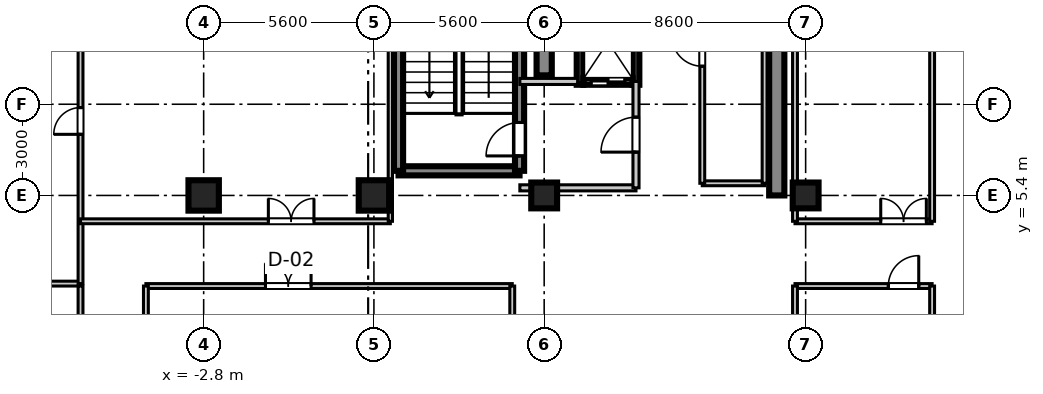
"""IFC4 building model, lengths in metres.
Left out: names, types, materials, properties, quantities, classifications, styles, units other than length and angle.
Written with IfcOpenShell. Run it as: python <this file> out.ifc"""

import sys

from ifc_helpers import new_model, si_unit, direction, frame, frame_2d, origin, origin_2d, place, context, subcontext, project, spatial, rectangle, extrude, source, transform, mapped, element, fill, save


model = new_model("IFC4")
c1 = context("Model", 3, precision=1e-05, world=origin(), true_north=direction((0.0, 1.0)))
c2 = subcontext(c1, "Body", "Model", "MODEL_VIEW")
j1 = project(units=[si_unit("LENGTHUNIT", "METRE"), si_unit("PLANEANGLEUNIT", "RADIAN")], contexts=[c1])
p1 = place(None, origin())
s1 = spatial("IfcSite", under=j1, at=p1, CompositionType="ELEMENT")
p2 = place(p1, origin())
s2 = spatial("IfcBuilding", under=s1, at=p2, CompositionType="ELEMENT")
p3 = place(p2, frame((0.0, 0.0, 249.3)))
s3 = spatial("IfcBuildingStorey", under=s2, at=p3, CompositionType="ELEMENT", Elevation=249.3)
m1 = source(origin(), c2, "Body", "SweptSolid", [
    extrude(rectangle(XDim=1.0, YDim=1.0, at=origin_2d()), origin(), (0.0, 0.0, 1.0), 3.655),
])
for number, where, z_axis, x_axis in (
    (1, (-2.8, 5.4, 0.0), (0.0, 0.0, 1.0), (1.0, 0.0, 0.0)),
    (2, (2.8, 5.4, 0.0), (0.0, 0.0, 1.0), (1.0, 0.0, 0.0)),
):
    element("IfcColumn", number, at=place(p3, frame(where, z_axis=z_axis, x_axis=x_axis)), inside=s3, PredefinedType="COLUMN", context=c2, shape_type="MappedRepresentation", body=[
        mapped(m1, transform((0.0, 0.0, 0.0), scale=1.0)),
    ])
m2 = source(origin(), c2, "Body", "SweptSolid", [
    extrude(rectangle(XDim=0.85, YDim=0.85, at=origin_2d()), origin(), (0.0, 0.0, 1.0), 3.655),
])
for number, where, z_axis, x_axis in (
    (3, (8.4, 5.4, 0.0), (0.0, 0.0, 1.0), (1.0, 0.0, 0.0)),
    (4, (17.0, 5.4, 0.0), (0.0, 0.0, 1.0), (1.0, 0.0, 0.0)),
):
    element("IfcColumn", number, at=place(p3, frame(where, z_axis=z_axis, x_axis=x_axis)), inside=s3, PredefinedType="PILASTER", context=c2, shape_type="MappedRepresentation", body=[
        mapped(m2, transform((0.0, 0.0, 0.0), scale=1.0)),
    ])
m3 = source(origin(), c2, "Body", "SweptSolid", [
    extrude(rectangle(XDim=7.65, YDim=0.5, at=frame_2d((3.825, 0.0))), origin(), (0.0, 0.0, 1.0), 3.41),
])
p4 = place(p3, frame((8.4, 9.35, 0.0), z_axis=(0.0, 0.0, 1.0), x_axis=(0.0, 1.0, 0.0)))
e5 = element("IfcWall", 5, at=p4, inside=s3, PredefinedType="SHEAR", context=c2, shape_type="MappedRepresentation", body=[
    mapped(m3, transform((0.0, 0.0, 0.0), scale=1.0)),
])
m4 = source(origin(), c2, "Body", "SweptSolid", [
    extrude(rectangle(XDim=11.6, YDim=0.5, at=frame_2d((5.8, 0.0))), origin(), (0.0, 0.0, 1.0), 3.41),
])
p5 = place(p3, frame((16.05, 5.4, 0.0), z_axis=(0.0, 0.0, 1.0), x_axis=(0.0, 1.0, 0.0)))
e6 = element("IfcWall", 6, at=p5, inside=s3, PredefinedType="SHEAR", context=c2, shape_type="MappedRepresentation", body=[
    mapped(m4, transform((0.0, 0.0, 0.0), scale=1.0)),
])
m5 = source(origin(), c2, "Body", "SweptSolid", [
    extrude(rectangle(XDim=3.98, YDim=0.3, at=frame_2d((1.99, 0.0))), origin(), (0.0, 0.0, 1.0), 3.41),
])
p6 = place(p3, frame((3.61, 6.21, 0.0), z_axis=(0.0, 0.0, 1.0), x_axis=(1.0, 0.0, 0.0)))
e7 = element("IfcWall", 7, at=p6, inside=s3, PredefinedType="SHEAR", context=c2, shape_type="MappedRepresentation", body=[
    mapped(m5, transform((0.0, 0.0, 0.0), scale=1.0)),
])
m6 = source(origin(), c2, "Body", "SweptSolid", [
    extrude(rectangle(XDim=9.38, YDim=0.3, at=frame_2d((4.69, 0.0))), origin(), (0.0, 0.0, 1.0), 3.41),
])
p7 = place(p3, frame((3.61, 6.21, 0.0), z_axis=(0.0, 0.0, 1.0), x_axis=(0.0, 1.0, 0.0)))
e8 = element("IfcWall", 8, at=p7, inside=s3, PredefinedType="SHEAR", context=c2, shape_type="MappedRepresentation", body=[
    mapped(m6, transform((0.0, 0.0, 0.0), scale=1.0)),
])
p8 = place(p3, frame((7.59, 6.21, 0.0), z_axis=(0.0, 0.0, 1.0), x_axis=(0.0, 1.0, 0.0)))
e9 = element("IfcWall", 9, at=p8, inside=s3, PredefinedType="SHEAR", context=c2, shape_type="MappedRepresentation", body=[
    mapped(m6, transform((0.0, 0.0, 0.0), scale=1.0)),
])
p9 = place(p8, frame((0.49, 0.0, 0.0)))
e10 = element("IfcOpeningElement", 10, at=p9, cuts=e9, PredefinedType="OPENING", context=c2, shape_type="SweptSolid", body=[
    extrude(rectangle(XDim=1.1, YDim=2.15, at=frame_2d((0.55, 1.075))), frame((0.0, 0.16, 0.0), z_axis=(0.0, -1.0, 0.0), x_axis=(1.0, 0.0, 0.0)), (0.0, 0.0, 1.0), 0.32),
])
m7 = source(origin(), c2, "Body", "SweptSolid", [
    extrude(rectangle(XDim=2.82, YDim=0.22, at=frame_2d((1.41, 0.0))), origin(), (0.0, 0.0, 1.0), 3.41),
])
for number, where, z_axis, x_axis in (
    (11, (9.58, 9.04, 0.0), (0.0, 0.0, 1.0), (0.0, 1.0, 0.0)),
    (12, (11.42, 9.04, 0.0), (0.0, 0.0, 1.0), (0.0, 1.0, 0.0)),
):
    element("IfcWall", number, at=place(p3, frame(where, z_axis=z_axis, x_axis=x_axis)), inside=s3, PredefinedType="SHEAR", context=c2, shape_type="MappedRepresentation", body=[
        mapped(m7, transform((0.0, 0.0, 0.0), scale=1.0)),
    ])
m8 = source(origin(), c2, "Body", "SweptSolid", [
    extrude(rectangle(XDim=1.62, YDim=0.22, at=frame_2d((0.81, 0.0))), origin(), (0.0, 0.0, 1.0), 3.41),
])
p10 = place(p3, frame((9.69, 9.15, 0.0), z_axis=(0.0, 0.0, 1.0), x_axis=(1.0, 0.0, 0.0)))
e13 = element("IfcWall", 13, at=p10, inside=s3, PredefinedType="SHEAR", context=c2, shape_type="MappedRepresentation", body=[
    mapped(m8, transform((0.0, 0.0, 0.0), scale=1.0)),
])
p11 = place(p10, frame((0.26, 0.0, 0.0)))
e14 = element("IfcOpeningElement", 14, at=p11, cuts=e13, PredefinedType="OPENING", context=c2, shape_type="SweptSolid", body=[
    extrude(rectangle(XDim=1.1, YDim=2.2, at=frame_2d((0.55, 1.1))), frame((0.0, 0.12, 0.0), z_axis=(0.0, -1.0, 0.0), x_axis=(1.0, 0.0, 0.0)), (0.0, 0.0, 1.0), 0.24),
])
m9 = source(origin(), c2, "Body", "SweptSolid", [
    extrude(rectangle(XDim=3.82, YDim=0.2, at=frame_2d((1.91, 0.0))), origin(), (0.0, 0.0, 1.0), 2.75),
])
p12 = place(p3, frame((7.6, 5.65, 0.0), z_axis=(0.0, 0.0, 1.0), x_axis=(1.0, 0.0, 0.0)))
e15 = element("IfcWall", 15, at=p12, inside=s3, PredefinedType="PARTITIONING", context=c2, shape_type="MappedRepresentation", body=[
    mapped(m9, transform((0.0, 0.0, 0.0), scale=1.0)),
])
m10 = source(origin(), c2, "Body", "SweptSolid", [
    extrude(rectangle(XDim=1.9, YDim=0.2, at=frame_2d((0.95, 0.0))), origin(), (0.0, 0.0, 1.0), 2.75),
])
p13 = place(p3, frame((7.6, 9.15, 0.0), z_axis=(0.0, 0.0, 1.0), x_axis=(1.0, 0.0, 0.0)))
e16 = element("IfcWall", 16, at=p13, inside=s3, PredefinedType="PARTITIONING", context=c2, shape_type="MappedRepresentation", body=[
    mapped(m10, transform((0.0, 0.0, 0.0), scale=1.0)),
])
m11 = source(origin(), c2, "Body", "SweptSolid", [
    extrude(rectangle(XDim=3.5, YDim=0.2, at=frame_2d((1.75, 0.0))), origin(), (0.0, 0.0, 1.0), 2.75),
])
p14 = place(p3, frame((11.42, 5.65, 0.0), z_axis=(0.0, 0.0, 1.0), x_axis=(0.0, 1.0, 0.0)))
e17 = element("IfcWall", 17, at=p14, inside=s3, PredefinedType="PARTITIONING", context=c2, shape_type="MappedRepresentation", body=[
    mapped(m11, transform((0.0, 0.0, 0.0), scale=1.0)),
])
p15 = place(p14, frame((1.175, 0.0, 0.0)))
e18 = element("IfcOpeningElement", 18, at=p15, cuts=e17, PredefinedType="OPENING", context=c2, shape_type="SweptSolid", body=[
    extrude(rectangle(XDim=1.15, YDim=2.15, at=frame_2d((0.575, 1.075))), frame((0.0, 0.11, 0.0), z_axis=(0.0, -1.0, 0.0), x_axis=(1.0, 0.0, 0.0)), (0.0, 0.0, 1.0), 0.22),
])
m12 = source(origin(), c2, "Body", "SweptSolid", [
    extrude(rectangle(XDim=2.05, YDim=0.16, at=frame_2d((1.025, 0.0))), origin(), (0.0, 0.0, 1.0), 2.75),
])
p16 = place(p3, frame((13.6, 5.8, 0.0), z_axis=(0.0, 0.0, 1.0), x_axis=(1.0, 0.0, 0.0)))
e19 = element("IfcWall", 19, at=p16, inside=s3, PredefinedType="PARTITIONING", context=c2, shape_type="MappedRepresentation", body=[
    mapped(m12, transform((0.0, 0.0, 0.0), scale=1.0)),
])
m13 = source(origin(), c2, "Body", "SweptSolid", [
    extrude(rectangle(XDim=8.7, YDim=0.16, at=frame_2d((4.35, 0.0))), origin(), (0.0, 0.0, 1.0), 2.75),
])
p17 = place(p3, frame((13.6, 5.8, 0.0), z_axis=(0.0, 0.0, 1.0), x_axis=(0.0, 1.0, 0.0)))
e20 = element("IfcWall", 20, at=p17, inside=s3, PredefinedType="PARTITIONING", context=c2, shape_type="MappedRepresentation", body=[
    mapped(m13, transform((0.0, 0.0, 0.0), scale=1.0)),
])
p18 = place(p17, frame((3.85, 0.0, 0.0)))
e21 = element("IfcOpeningElement", 21, at=p18, cuts=e20, PredefinedType="OPENING", context=c2, shape_type="SweptSolid", body=[
    extrude(rectangle(XDim=1.0, YDim=2.1, at=frame_2d((0.5, 1.05))), frame((0.0, 0.09, 0.0), z_axis=(0.0, -1.0, 0.0), x_axis=(1.0, 0.0, 0.0)), (0.0, 0.0, 1.0), 0.18),
])
p19 = place(p3, frame((15.65, 5.8, 0.0), z_axis=(0.0, 0.0, 1.0), x_axis=(0.0, 1.0, 0.0)))
e22 = element("IfcWall", 22, at=p19, inside=s3, PredefinedType="PARTITIONING", context=c2, shape_type="MappedRepresentation", body=[
    mapped(m13, transform((0.0, 0.0, 0.0), scale=1.0)),
])
m14 = source(origin(), c2, "Body", "SweptSolid", [
    extrude(rectangle(XDim=4.51, YDim=0.16, at=frame_2d((2.255, 0.0))), origin(), (0.0, 0.0, 1.0), 2.75),
])
p20 = place(p3, frame((16.65, 4.55, 0.0), z_axis=(0.0, 0.0, 1.0), x_axis=(1.0, 0.0, 0.0)))
e23 = element("IfcWall", 23, at=p20, inside=s3, PredefinedType="PARTITIONING", context=c2, shape_type="MappedRepresentation", body=[
    mapped(m14, transform((0.0, 0.0, 0.0), scale=1.0)),
])
p21 = place(p20, frame((2.82, 0.0, 0.0)))
e24 = element("IfcOpeningElement", 24, at=p21, cuts=e23, PredefinedType="OPENING", context=c2, shape_type="SweptSolid", body=[
    extrude(rectangle(XDim=1.5, YDim=2.15, at=frame_2d((0.75, 1.075))), frame((0.0, 0.09, 0.0), z_axis=(0.0, -1.0, 0.0), x_axis=(1.0, 0.0, 0.0)), (0.0, 0.0, 1.0), 0.18),
])
m15 = source(origin(), c2, "Body", "SweptSolid", [
    extrude(rectangle(XDim=19.35, YDim=0.16, at=frame_2d((9.675, 0.0))), origin(), (0.0, 0.0, 1.0), 2.75),
])
p22 = place(p3, frame((16.65, 4.55, 0.0), z_axis=(0.0, 0.0, 1.0), x_axis=(0.0, 1.0, 0.0)))
e25 = element("IfcWall", 25, at=p22, inside=s3, PredefinedType="PARTITIONING", context=c2, shape_type="MappedRepresentation", body=[
    mapped(m15, transform((0.0, 0.0, 0.0), scale=1.0)),
])
m16 = source(origin(), c2, "Body", "SweptSolid", [
    extrude(rectangle(XDim=17.93, YDim=0.16, at=frame_2d((8.965, 0.0))), origin(), (0.0, 0.0, 1.0), 2.75),
])
p23 = place(p3, frame((21.16, 4.55, 0.0), z_axis=(0.0, 0.0, 1.0), x_axis=(0.0, 1.0, 0.0)))
e26 = element("IfcWall", 26, at=p23, inside=s3, PredefinedType="PARTITIONING", context=c2, shape_type="MappedRepresentation", body=[
    mapped(m16, transform((0.0, 0.0, 0.0), scale=1.0)),
])
m17 = source(origin(), c2, "Body", "SweptSolid", [
    extrude(rectangle(XDim=14.31, YDim=0.16, at=frame_2d((7.155, 0.0))), origin(), (0.0, 0.0, 1.0), 2.75),
])
p24 = place(p3, frame((-21.16, 2.5, 0.0), z_axis=(0.0, 0.0, 1.0), x_axis=(1.0, 0.0, 0.0)))
e27 = element("IfcWall", 27, at=p24, inside=s3, PredefinedType="PARTITIONING", context=c2, shape_type="MappedRepresentation", body=[
    mapped(m17, transform((0.0, 0.0, 0.0), scale=1.0)),
])
m18 = source(origin(), c2, "Body", "SweptSolid", [
    extrude(rectangle(XDim=10.7, YDim=0.16, at=frame_2d((5.35, 0.0))), origin(), (0.0, 0.0, 1.0), 2.75),
])
p25 = place(p3, frame((-6.85, 2.5, 0.0), z_axis=(0.0, 0.0, 1.0), x_axis=(0.0, 1.0, 0.0)))
e28 = element("IfcWall", 28, at=p25, inside=s3, PredefinedType="PARTITIONING", context=c2, shape_type="MappedRepresentation", body=[
    mapped(m18, transform((0.0, 0.0, 0.0), scale=1.0)),
])
p26 = place(p25, frame((4.91, 0.0, 0.0)))
e29 = element("IfcOpeningElement", 29, at=p26, cuts=e28, PredefinedType="OPENING", context=c2, shape_type="SweptSolid", body=[
    extrude(rectangle(XDim=0.88, YDim=2.1, at=frame_2d((0.44, 1.05))), frame((0.0, 0.09, 0.0), z_axis=(0.0, -1.0, 0.0), x_axis=(1.0, 0.0, 0.0)), (0.0, 0.0, 1.0), 0.18),
])
m19 = source(origin(), c2, "Body", "SweptSolid", [
    extrude(rectangle(XDim=10.19, YDim=0.16, at=frame_2d((5.095, 0.0))), origin(), (0.0, 0.0, 1.0), 2.75),
])
p27 = place(p3, frame((-6.85, 4.55, 0.0), z_axis=(0.0, 0.0, 1.0), x_axis=(1.0, 0.0, 0.0)))
e30 = element("IfcWall", 30, at=p27, inside=s3, PredefinedType="PARTITIONING", context=c2, shape_type="MappedRepresentation", body=[
    mapped(m19, transform((0.0, 0.0, 0.0), scale=1.0)),
])
p28 = place(p27, frame((6.178, 0.0, 0.0)))
e31 = element("IfcOpeningElement", 31, at=p28, cuts=e30, PredefinedType="OPENING", context=c2, shape_type="SweptSolid", body=[
    extrude(rectangle(XDim=1.5, YDim=2.15, at=frame_2d((0.75, 1.075))), frame((0.0, 0.09, 0.0), z_axis=(0.0, -1.0, 0.0), x_axis=(1.0, 0.0, 0.0)), (0.0, 0.0, 1.0), 0.18),
])
m20 = source(origin(), c2, "Body", "SweptSolid", [
    extrude(rectangle(XDim=19.35, YDim=0.14, at=frame_2d((9.675, 0.0))), origin(), (0.0, 0.0, 1.0), 2.75),
])
p29 = place(p3, frame((3.34, 4.55, 0.0), z_axis=(0.0, 0.0, 1.0), x_axis=(0.0, 1.0, 0.0)))
e32 = element("IfcWall", 32, at=p29, inside=s3, PredefinedType="PARTITIONING", context=c2, shape_type="MappedRepresentation", body=[
    mapped(m20, transform((0.0, 0.0, 0.0), scale=1.0)),
])
m21 = source(origin(), c2, "Body", "SweptSolid", [
    extrude(rectangle(XDim=4.84, YDim=0.16, at=frame_2d((2.42, 0.0))), origin(), (0.0, 0.0, 1.0), 2.75),
])
p30 = place(p3, frame((-6.85, -2.42, 0.0), z_axis=(0.0, 0.0, 1.0), x_axis=(0.0, 1.0, 0.0)))
e33 = element("IfcWall", 33, at=p30, inside=s3, PredefinedType="PARTITIONING", context=c2, shape_type="MappedRepresentation", body=[
    mapped(m21, transform((0.0, 0.0, 0.0), scale=1.0)),
])
p31 = place(p30, frame((1.945, 0.0, 0.0)))
e34 = element("IfcOpeningElement", 34, at=p31, cuts=e33, PredefinedType="OPENING", context=c2, shape_type="SweptSolid", body=[
    extrude(rectangle(XDim=0.95, YDim=2.1, at=frame_2d((0.475, 1.05))), frame((0.0, 0.09, 0.0), z_axis=(0.0, -1.0, 0.0), x_axis=(1.0, 0.0, 0.0)), (0.0, 0.0, 1.0), 0.18),
])
m22 = source(origin(), c2, "Body", "SweptSolid", [
    extrude(rectangle(XDim=12.05, YDim=0.16, at=frame_2d((6.025, 0.0))), origin(), (0.0, 0.0, 1.0), 2.75),
])
p32 = place(p3, frame((-4.7, 2.42, 0.0), z_axis=(0.0, 0.0, 1.0), x_axis=(1.0, 0.0, 0.0)))
e35 = element("IfcWall", 35, at=p32, inside=s3, PredefinedType="PARTITIONING", context=c2, shape_type="MappedRepresentation", body=[
    mapped(m22, transform((0.0, 0.0, 0.0), scale=1.0)),
])
p33 = place(p32, frame((3.933, 0.0, 0.0)))
e36 = element("IfcOpeningElement", 36, at=p33, cuts=e35, PredefinedType="OPENING", context=c2, shape_type="SweptSolid", body=[
    extrude(rectangle(XDim=1.5, YDim=2.15, at=frame_2d((0.75, 1.075))), frame((0.0, 0.09, 0.0), z_axis=(0.0, -1.0, 0.0), x_axis=(1.0, 0.0, 0.0)), (0.0, 0.0, 1.0), 0.18),
])
for number, where, z_axis, x_axis in (
    (37, (-4.7, -2.42, 0.0), (0.0, 0.0, 1.0), (0.0, 1.0, 0.0)),
    (38, (7.35, -2.42, 0.0), (0.0, 0.0, 1.0), (0.0, 1.0, 0.0)),
):
    element("IfcWall", number, at=place(p3, frame(where, z_axis=z_axis, x_axis=x_axis)), inside=s3, PredefinedType="PARTITIONING", context=c2, shape_type="MappedRepresentation", body=[
        mapped(m21, transform((0.0, 0.0, 0.0), scale=1.0)),
    ])
p34 = place(p3, frame((16.65, 2.42, 0.0), z_axis=(0.0, 0.0, 1.0), x_axis=(1.0, 0.0, 0.0)))
e39 = element("IfcWall", 39, at=p34, inside=s3, PredefinedType="PARTITIONING", context=c2, shape_type="MappedRepresentation", body=[
    mapped(m14, transform((0.0, 0.0, 0.0), scale=1.0)),
])
p35 = place(p34, frame((3.07, 0.0, 0.0)))
e40 = element("IfcOpeningElement", 40, at=p35, cuts=e39, PredefinedType="OPENING", context=c2, shape_type="SweptSolid", body=[
    extrude(rectangle(XDim=1.0, YDim=2.1, at=frame_2d((0.5, 1.05))), frame((0.0, 0.09, 0.0), z_axis=(0.0, -1.0, 0.0), x_axis=(1.0, 0.0, 0.0)), (0.0, 0.0, 1.0), 0.18),
])
for number, where, z_axis, x_axis in (
    (41, (16.65, -2.42, 0.0), (0.0, 0.0, 1.0), (0.0, 1.0, 0.0)),
    (42, (21.16, -2.42, 0.0), (0.0, 0.0, 1.0), (0.0, 1.0, 0.0)),
):
    element("IfcWall", number, at=place(p3, frame(where, z_axis=z_axis, x_axis=x_axis)), inside=s3, PredefinedType="PARTITIONING", context=c2, shape_type="MappedRepresentation", body=[
        mapped(m21, transform((0.0, 0.0, 0.0), scale=1.0)),
    ])
m23 = source(origin(), c2, "Body", "SweptSolid", [
    extrude(rectangle(XDim=1.1, YDim=2.15, at=frame_2d((0.55, 1.075))), frame((0.0, 0.025, 0.0), z_axis=(0.0, -1.0, 0.0), x_axis=(1.0, 0.0, 0.0)), (0.0, 0.0, 1.0), 0.05),
])
p36 = place(p9, origin())
e43 = element("IfcDoor", 43, at=p36, inside=s3, OperationType="SINGLE_SWING_LEFT", PredefinedType="DOOR", context=c2, shape_type="MappedRepresentation", body=[
    mapped(m23, transform((0.0, 0.0, 0.0), scale=1.0)),
])
fill(e10, e43)
m24 = source(origin(), c2, "Body", "SweptSolid", [
    extrude(rectangle(XDim=1.1, YDim=2.2, at=frame_2d((0.55, 1.1))), frame((0.0, 0.025, 0.0), z_axis=(0.0, -1.0, 0.0), x_axis=(1.0, 0.0, 0.0)), (0.0, 0.0, 1.0), 0.05),
])
p37 = place(p11, frame((1.1, 0.0, 0.0), z_axis=(0.0, 0.0, 1.0), x_axis=(-1.0, 0.0, 0.0)))
e44 = element("IfcDoor", 44, at=p37, inside=s3, OperationType="DOUBLE_DOOR_SLIDING", PredefinedType="DOOR", context=c2, shape_type="MappedRepresentation", body=[
    mapped(m24, transform((0.0, 0.0, 0.0), scale=1.0)),
])
fill(e14, e44)
m25 = source(origin(), c2, "Body", "SweptSolid", [
    extrude(rectangle(XDim=1.15, YDim=2.15, at=frame_2d((0.575, 1.075))), frame((0.0, 0.025, 0.0), z_axis=(0.0, -1.0, 0.0), x_axis=(1.0, 0.0, 0.0)), (0.0, 0.0, 1.0), 0.05),
])
p38 = place(p15, frame((1.15, 0.0, 0.0), z_axis=(0.0, 0.0, 1.0), x_axis=(-1.0, 0.0, 0.0)))
e45 = element("IfcDoor", 45, at=p38, inside=s3, OperationType="SINGLE_SWING_LEFT", PredefinedType="DOOR", context=c2, shape_type="MappedRepresentation", body=[
    mapped(m25, transform((0.0, 0.0, 0.0), scale=1.0)),
])
fill(e18, e45)
m26 = source(origin(), c2, "Body", "SweptSolid", [
    extrude(rectangle(XDim=1.0, YDim=2.1, at=frame_2d((0.5, 1.05))), frame((0.0, 0.025, 0.0), z_axis=(0.0, -1.0, 0.0), x_axis=(1.0, 0.0, 0.0)), (0.0, 0.0, 1.0), 0.05),
])
p39 = place(p18, frame((1.0, 0.0, 0.0), z_axis=(0.0, 0.0, 1.0), x_axis=(-1.0, 0.0, 0.0)))
e46 = element("IfcDoor", 46, at=p39, inside=s3, OperationType="SINGLE_SWING_RIGHT", PredefinedType="DOOR", context=c2, shape_type="MappedRepresentation", body=[
    mapped(m26, transform((0.0, 0.0, 0.0), scale=1.0)),
])
fill(e21, e46)
m27 = source(origin(), c2, "Body", "SweptSolid", [
    extrude(rectangle(XDim=1.5, YDim=2.15, at=frame_2d((0.75, 1.075))), frame((0.0, 0.025, 0.0), z_axis=(0.0, -1.0, 0.0), x_axis=(1.0, 0.0, 0.0)), (0.0, 0.0, 1.0), 0.05),
])
p40 = place(p21, origin())
e47 = element("IfcDoor", 47, at=p40, inside=s3, OperationType="DOUBLE_DOOR_SINGLE_SWING", PredefinedType="DOOR", context=c2, shape_type="MappedRepresentation", body=[
    mapped(m27, transform((0.0, 0.0, 0.0), scale=1.0)),
])
fill(e24, e47)
m28 = source(origin(), c2, "Body", "SweptSolid", [
    extrude(rectangle(XDim=0.88, YDim=2.1, at=frame_2d((0.44, 1.05))), frame((0.0, 0.025, 0.0), z_axis=(0.0, -1.0, 0.0), x_axis=(1.0, 0.0, 0.0)), (0.0, 0.0, 1.0), 0.05),
])
p41 = place(p26, origin())
e48 = element("IfcDoor", 48, at=p41, inside=s3, OperationType="SINGLE_SWING_LEFT", PredefinedType="DOOR", context=c2, shape_type="MappedRepresentation", body=[
    mapped(m28, transform((0.0, 0.0, 0.0), scale=1.0)),
])
fill(e29, e48)
p42 = place(p28, origin())
e49 = element("IfcDoor", 49, at=p42, inside=s3, OperationType="DOUBLE_DOOR_SINGLE_SWING", PredefinedType="DOOR", context=c2, shape_type="MappedRepresentation", body=[
    mapped(m27, transform((0.0, 0.0, 0.0), scale=1.0)),
])
fill(e31, e49)
p43 = place(p33, frame((1.5, 0.0, 0.0), z_axis=(0.0, 0.0, 1.0), x_axis=(-1.0, 0.0, 0.0)))
e50 = element("IfcDoor", 50, at=p43, inside=s3, OperationType="DOUBLE_DOOR_SINGLE_SWING", PredefinedType="DOOR", context=c2, shape_type="MappedRepresentation", body=[
    mapped(m27, transform((0.0, 0.0, 0.0), scale=1.0)),
])
fill(e36, e50)
p44 = place(p35, frame((1.0, 0.0, 0.0), z_axis=(0.0, 0.0, 1.0), x_axis=(-1.0, 0.0, 0.0)))
e51 = element("IfcDoor", 51, at=p44, inside=s3, OperationType="SINGLE_SWING_RIGHT", PredefinedType="DOOR", context=c2, shape_type="MappedRepresentation", body=[
    mapped(m26, transform((0.0, 0.0, 0.0), scale=1.0)),
])
fill(e40, e51)
save(model, sys.argv[1])
